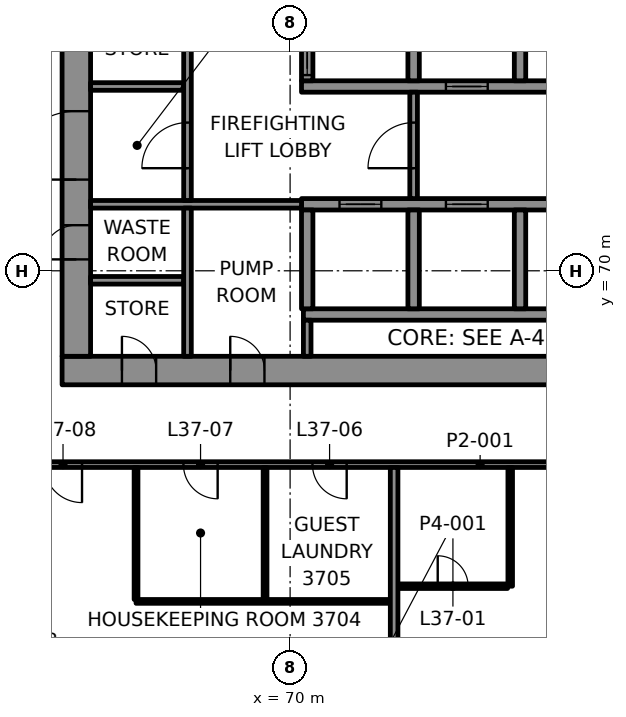
"""IFC4 building model, lengths in metres.
Left out: names, types, materials, properties, quantities, classifications, styles, units other than length and angle.
Written with IfcOpenShell. Run it as: python <this file> out.ifc"""

import sys

from ifc_helpers import new_model, si_unit, direction, frame, frame_2d, origin, place, context, subcontext, project, spatial, rectangle, extrude, element, fill, save


model = new_model("IFC4")
c1 = context("Model", 3, precision=1e-05, world=origin(), true_north=direction((0.0, 1.0)))
c2 = subcontext(c1, "Body", "Model", "MODEL_VIEW")
j1 = project(units=[si_unit("LENGTHUNIT", "METRE"), si_unit("PLANEANGLEUNIT", "RADIAN")], contexts=[c1])
p1 = place(None, origin())
s1 = spatial("IfcSite", under=j1, at=p1, CompositionType="ELEMENT")
p2 = place(p1, origin())
s2 = spatial("IfcBuilding", under=s1, at=p2, CompositionType="ELEMENT")
p3 = place(p2, frame((0.0, 0.0, 163.6)))
s3 = spatial("IfcBuildingStorey", under=s2, at=p3, CompositionType="ELEMENT", Elevation=163.6)
p4 = place(p3, frame((64.0, 67.375, 0.0), z_axis=(0.0, 0.0, 1.0), x_axis=(1.0, 0.0, 0.0)))
e1 = element("IfcWall", 1, at=p4, inside=s3, PredefinedType="SHEAR", context=c2, shape_type="SweptSolid", body=[
    extrude(rectangle(XDim=22.0, YDim=0.75, at=frame_2d((11.0, 0.0))), origin(), (0.0, 0.0, 1.0), 3.7),
])
p5 = place(p4, frame((1.575, 0.0, 0.0)))
e2 = element("IfcOpeningElement", 2, at=p5, cuts=e1, PredefinedType="OPENING", context=c2, shape_type="SweptSolid", body=[
    extrude(rectangle(XDim=0.9, YDim=2.1, at=frame_2d((0.45, 1.05))), frame((0.0, 0.385, 0.0), z_axis=(0.0, -1.0, 0.0), x_axis=(1.0, 0.0, 0.0)), (0.0, 0.0, 1.0), 0.77),
])
p6 = place(p4, frame((4.425, 0.0, 0.0)))
e3 = element("IfcOpeningElement", 3, at=p6, cuts=e1, PredefinedType="OPENING", context=c2, shape_type="SweptSolid", body=[
    extrude(rectangle(XDim=0.9, YDim=2.1, at=frame_2d((0.45, 1.05))), frame((0.0, 0.385, 0.0), z_axis=(0.0, -1.0, 0.0), x_axis=(1.0, 0.0, 0.0)), (0.0, 0.0, 1.0), 0.77),
])
p7 = place(p3, frame((64.375, 67.75, 0.0), z_axis=(0.0, 0.0, 1.0), x_axis=(0.0, 1.0, 0.0)))
e4 = element("IfcWall", 4, at=p7, inside=s3, PredefinedType="SHEAR", context=c2, shape_type="SweptSolid", body=[
    extrude(rectangle(XDim=14.5, YDim=0.75, at=frame_2d((7.25, 0.0))), origin(), (0.0, 0.0, 1.0), 3.7),
])
p8 = place(p7, frame((4.65, 0.0, 0.0)))
e5 = element("IfcOpeningElement", 5, at=p8, cuts=e4, PredefinedType="OPENING", context=c2, shape_type="SweptSolid", body=[
    extrude(rectangle(XDim=1.8, YDim=2.1, at=frame_2d((0.9, 1.05))), frame((0.0, 0.385, 0.0), z_axis=(0.0, -1.0, 0.0), x_axis=(1.0, 0.0, 0.0)), (0.0, 0.0, 1.0), 0.77),
])
p9 = place(p7, frame((2.55, 0.0, 0.0)))
e6 = element("IfcOpeningElement", 6, at=p9, cuts=e4, PredefinedType="OPENING", context=c2, shape_type="SweptSolid", body=[
    extrude(rectangle(XDim=0.9, YDim=2.1, at=frame_2d((0.45, 1.05))), frame((0.0, 0.385, 0.0), z_axis=(0.0, -1.0, 0.0), x_axis=(1.0, 0.0, 0.0)), (0.0, 0.0, 1.0), 0.77),
])
p10 = place(p7, frame((10.35, 0.0, 0.0)))
e7 = element("IfcOpeningElement", 7, at=p10, cuts=e4, PredefinedType="OPENING", context=c2, shape_type="SweptSolid", body=[
    extrude(rectangle(XDim=0.9, YDim=2.1, at=frame_2d((0.45, 1.05))), frame((0.0, 0.385, 0.0), z_axis=(0.0, -1.0, 0.0), x_axis=(1.0, 0.0, 0.0)), (0.0, 0.0, 1.0), 0.77),
])
p11 = place(p3, frame((70.35, 68.85, 0.0), z_axis=(0.0, 0.0, 1.0), x_axis=(1.0, 0.0, 0.0)))
e8 = element("IfcWall", 8, at=p11, inside=s3, PredefinedType="SHEAR", context=c2, shape_type="SweptSolid", body=[
    extrude(rectangle(XDim=14.2, YDim=0.3, at=frame_2d((7.1, 0.0))), origin(), (0.0, 0.0, 1.0), 3.7),
])
p12 = place(p3, frame((70.3, 71.75, 0.0), z_axis=(0.0, 0.0, 1.0), x_axis=(1.0, 0.0, 0.0)))
e9 = element("IfcWall", 9, at=p12, inside=s3, PredefinedType="SHEAR", context=c2, shape_type="SweptSolid", body=[
    extrude(rectangle(XDim=14.3, YDim=0.3, at=frame_2d((7.15, 0.0))), origin(), (0.0, 0.0, 1.0), 3.7),
])
p13 = place(p12, frame((1.0, 0.0, 0.0)))
e10 = element("IfcOpeningElement", 10, at=p13, cuts=e9, PredefinedType="OPENING", context=c2, shape_type="SweptSolid", body=[
    extrude(rectangle(XDim=1.1, YDim=2.1, at=frame_2d((0.55, 1.05))), frame((0.0, 0.16, 0.0), z_axis=(0.0, -1.0, 0.0), x_axis=(1.0, 0.0, 0.0)), (0.0, 0.0, 1.0), 0.32),
])
p14 = place(p12, frame((3.8, 0.0, 0.0)))
e11 = element("IfcOpeningElement", 11, at=p14, cuts=e9, PredefinedType="OPENING", context=c2, shape_type="SweptSolid", body=[
    extrude(rectangle(XDim=1.1, YDim=2.1, at=frame_2d((0.55, 1.05))), frame((0.0, 0.16, 0.0), z_axis=(0.0, -1.0, 0.0), x_axis=(1.0, 0.0, 0.0)), (0.0, 0.0, 1.0), 0.32),
])
p15 = place(p12, frame((6.6, 0.0, 0.0)))
e12 = element("IfcOpeningElement", 12, at=p15, cuts=e9, PredefinedType="OPENING", context=c2, shape_type="SweptSolid", body=[
    extrude(rectangle(XDim=1.1, YDim=2.1, at=frame_2d((0.55, 1.05))), frame((0.0, 0.16, 0.0), z_axis=(0.0, -1.0, 0.0), x_axis=(1.0, 0.0, 0.0)), (0.0, 0.0, 1.0), 0.32),
])
p16 = place(p12, frame((9.4, 0.0, 0.0)))
e13 = element("IfcOpeningElement", 13, at=p16, cuts=e9, PredefinedType="OPENING", context=c2, shape_type="SweptSolid", body=[
    extrude(rectangle(XDim=1.1, YDim=2.1, at=frame_2d((0.55, 1.05))), frame((0.0, 0.16, 0.0), z_axis=(0.0, -1.0, 0.0), x_axis=(1.0, 0.0, 0.0)), (0.0, 0.0, 1.0), 0.32),
])
p17 = place(p12, frame((12.2, 0.0, 0.0)))
e14 = element("IfcOpeningElement", 14, at=p17, cuts=e9, PredefinedType="OPENING", context=c2, shape_type="SweptSolid", body=[
    extrude(rectangle(XDim=1.1, YDim=2.1, at=frame_2d((0.55, 1.05))), frame((0.0, 0.16, 0.0), z_axis=(0.0, -1.0, 0.0), x_axis=(1.0, 0.0, 0.0)), (0.0, 0.0, 1.0), 0.32),
])
p18 = place(p3, frame((70.3, 74.85, 0.0), z_axis=(0.0, 0.0, 1.0), x_axis=(1.0, 0.0, 0.0)))
e15 = element("IfcWall", 15, at=p18, inside=s3, PredefinedType="SHEAR", context=c2, shape_type="SweptSolid", body=[
    extrude(rectangle(XDim=14.3, YDim=0.3, at=frame_2d((7.15, 0.0))), origin(), (0.0, 0.0, 1.0), 3.7),
])
p19 = place(p18, frame((3.8, 0.0, 0.0)))
e16 = element("IfcOpeningElement", 16, at=p19, cuts=e15, PredefinedType="OPENING", context=c2, shape_type="SweptSolid", body=[
    extrude(rectangle(XDim=1.1, YDim=2.1, at=frame_2d((0.55, 1.05))), frame((0.0, 0.16, 0.0), z_axis=(0.0, -1.0, 0.0), x_axis=(1.0, 0.0, 0.0)), (0.0, 0.0, 1.0), 0.32),
])
p20 = place(p18, frame((12.2, 0.0, 0.0)))
e17 = element("IfcOpeningElement", 17, at=p20, cuts=e15, PredefinedType="OPENING", context=c2, shape_type="SweptSolid", body=[
    extrude(rectangle(XDim=1.1, YDim=2.1, at=frame_2d((0.55, 1.05))), frame((0.0, 0.16, 0.0), z_axis=(0.0, -1.0, 0.0), x_axis=(1.0, 0.0, 0.0)), (0.0, 0.0, 1.0), 0.32),
])
p21 = place(p3, frame((70.45, 69.0, 0.0), z_axis=(0.0, 0.0, 1.0), x_axis=(0.0, 1.0, 0.0)))
e18 = element("IfcWall", 18, at=p21, inside=s3, PredefinedType="SHEAR", context=c2, shape_type="SweptSolid", body=[
    extrude(rectangle(XDim=2.6, YDim=0.3, at=frame_2d((1.3, 0.0))), origin(), (0.0, 0.0, 1.0), 3.7),
])
p22 = place(p3, frame((70.45, 75.0, 0.0), z_axis=(0.0, 0.0, 1.0), x_axis=(0.0, 1.0, 0.0)))
e19 = element("IfcWall", 19, at=p22, inside=s3, PredefinedType="SHEAR", context=c2, shape_type="SweptSolid", body=[
    extrude(rectangle(XDim=2.6, YDim=0.3, at=frame_2d((1.3, 0.0))), origin(), (0.0, 0.0, 1.0), 3.7),
])
p23 = place(p22, frame((0.15, 0.0, 0.0)))
e20 = element("IfcOpeningElement", 20, at=p23, cuts=e19, PredefinedType="OPENING", context=c2, shape_type="SweptSolid", body=[
    extrude(rectangle(XDim=1.1, YDim=2.1, at=frame_2d((0.55, 1.05))), frame((0.0, 0.16, 0.0), z_axis=(0.0, -1.0, 0.0), x_axis=(1.0, 0.0, 0.0)), (0.0, 0.0, 1.0), 0.32),
])
for number, where, z_axis, x_axis in (
    (21, (73.25, 69.0, 0.0), (0.0, 0.0, 1.0), (0.0, 1.0, 0.0)),
    (22, (73.25, 75.0, 0.0), (0.0, 0.0, 1.0), (0.0, 1.0, 0.0)),
    (23, (76.05, 69.0, 0.0), (0.0, 0.0, 1.0), (0.0, 1.0, 0.0)),
    (24, (76.05, 75.0, 0.0), (0.0, 0.0, 1.0), (0.0, 1.0, 0.0)),
):
    element("IfcWall", number, at=place(p3, frame(where, z_axis=z_axis, x_axis=x_axis)), inside=s3, PredefinedType="SHEAR", context=c2, shape_type="SweptSolid", body=[
        extrude(rectangle(XDim=2.6, YDim=0.3, at=frame_2d((1.3, 0.0))), origin(), (0.0, 0.0, 1.0), 3.7),
    ])
p24 = place(p3, frame((65.946, 61.3, 0.0), z_axis=(0.0, 0.0, 1.0), x_axis=(1.0, 0.0, 0.0)))
e25 = element("IfcWall", 25, at=p24, inside=s3, PredefinedType="PARTITIONING", context=c2, shape_type="SweptSolid", body=[
    extrude(rectangle(XDim=6.69, YDim=0.1, at=frame_2d((3.345, 0.0))), origin(), (0.0, 0.0, 1.0), 3.1),
])
p25 = place(p3, frame((72.846, 61.7, 0.0), z_axis=(0.0, 0.0, 1.0), x_axis=(1.0, 0.0, 0.0)))
e26 = element("IfcWall", 26, at=p25, inside=s3, PredefinedType="PARTITIONING", context=c2, shape_type="SweptSolid", body=[
    extrude(rectangle(XDim=2.876, YDim=0.12, at=frame_2d((1.438, 0.0))), origin(), (0.0, 0.0, 1.0), 3.1),
])
p26 = place(p25, frame((1.038, 0.0, 0.0)))
e27 = element("IfcOpeningElement", 27, at=p26, cuts=e26, PredefinedType="OPENING", context=c2, shape_type="SweptSolid", body=[
    extrude(rectangle(XDim=0.8, YDim=2.1, at=frame_2d((0.4, 1.05))), frame((0.0, 0.07, 0.0), z_axis=(0.0, -1.0, 0.0), x_axis=(1.0, 0.0, 0.0)), (0.0, 0.0, 1.0), 0.14),
])
p27 = place(p3, frame((88.1, 64.9, 0.0), z_axis=(0.0, 0.0, 1.0), x_axis=(-1.0, 0.0, 0.0)))
e28 = element("IfcWall", 28, at=p27, inside=s3, PredefinedType="PARTITIONING", context=c2, shape_type="SweptSolid", body=[
    extrude(rectangle(XDim=26.199, YDim=0.15, at=frame_2d((13.1, 0.0))), origin(), (0.0, 0.0, 1.0), 3.1),
])
p28 = place(p27, frame((0.322, 0.0, 0.0)))
e29 = element("IfcOpeningElement", 29, at=p28, cuts=e28, PredefinedType="OPENING", context=c2, shape_type="SweptSolid", body=[
    extrude(rectangle(XDim=1.0, YDim=2.1, at=frame_2d((0.5, 1.05))), frame((0.0, 0.085, 0.0), z_axis=(0.0, -1.0, 0.0), x_axis=(1.0, 0.0, 0.0)), (0.0, 0.0, 1.0), 0.17),
])
p29 = place(p27, frame((5.859, 0.0, 0.0)))
e30 = element("IfcOpeningElement", 30, at=p29, cuts=e28, PredefinedType="OPENING", context=c2, shape_type="SweptSolid", body=[
    extrude(rectangle(XDim=0.9, YDim=2.1, at=frame_2d((0.45, 1.05))), frame((0.0, 0.085, 0.0), z_axis=(0.0, -1.0, 0.0), x_axis=(1.0, 0.0, 0.0)), (0.0, 0.0, 1.0), 0.17),
])
p30 = place(p27, frame((8.981, 0.0, 0.0)))
e31 = element("IfcOpeningElement", 31, at=p30, cuts=e28, PredefinedType="OPENING", context=c2, shape_type="SweptSolid", body=[
    extrude(rectangle(XDim=1.0, YDim=2.1, at=frame_2d((0.5, 1.05))), frame((0.0, 0.085, 0.0), z_axis=(0.0, -1.0, 0.0), x_axis=(1.0, 0.0, 0.0)), (0.0, 0.0, 1.0), 0.17),
])
p31 = place(p27, frame((16.611, 0.0, 0.0)))
e32 = element("IfcOpeningElement", 32, at=p31, cuts=e28, PredefinedType="OPENING", context=c2, shape_type="SweptSolid", body=[
    extrude(rectangle(XDim=0.9, YDim=2.1, at=frame_2d((0.45, 1.05))), frame((0.0, 0.085, 0.0), z_axis=(0.0, -1.0, 0.0), x_axis=(1.0, 0.0, 0.0)), (0.0, 0.0, 1.0), 0.17),
])
p32 = place(p27, frame((20.006, 0.0, 0.0)))
e33 = element("IfcOpeningElement", 33, at=p32, cuts=e28, PredefinedType="OPENING", context=c2, shape_type="SweptSolid", body=[
    extrude(rectangle(XDim=0.9, YDim=2.1, at=frame_2d((0.45, 1.05))), frame((0.0, 0.085, 0.0), z_axis=(0.0, -1.0, 0.0), x_axis=(1.0, 0.0, 0.0)), (0.0, 0.0, 1.0), 0.17),
])
p33 = place(p27, frame((23.575, 0.0, 0.0)))
e34 = element("IfcOpeningElement", 34, at=p33, cuts=e28, PredefinedType="OPENING", context=c2, shape_type="SweptSolid", body=[
    extrude(rectangle(XDim=1.0, YDim=2.1, at=frame_2d((0.5, 1.05))), frame((0.0, 0.085, 0.0), z_axis=(0.0, -1.0, 0.0), x_axis=(1.0, 0.0, 0.0)), (0.0, 0.0, 1.0), 0.17),
])
p34 = place(p3, frame((75.792, 61.7, 0.0), z_axis=(0.0, 0.0, 1.0), x_axis=(0.0, 1.0, 0.0)))
e35 = element("IfcWall", 35, at=p34, inside=s3, PredefinedType="PARTITIONING", context=c2, shape_type="SweptSolid", body=[
    extrude(rectangle(XDim=3.125, YDim=0.12, at=frame_2d((1.562, 0.0))), origin(), (0.0, 0.0, 1.0), 3.1),
])
p35 = place(p3, frame((72.737, 55.101, 0.0), z_axis=(0.0, 0.0, 1.0), x_axis=(0.0, 1.0, 0.0)))
e36 = element("IfcWall", 36, at=p35, inside=s3, PredefinedType="PARTITIONING", context=c2, shape_type="SweptSolid", body=[
    extrude(rectangle(XDim=9.724, YDim=0.2, at=frame_2d((4.862, 0.0))), origin(), (0.0, 0.0, 1.0), 2.865),
])
for number, where, z_axis, x_axis in (
    (37, (69.341, 61.35, 0.0), (0.0, 0.0, 1.0), (0.0, 1.0, 0.0)),
    (38, (65.946, 61.35, 0.0), (0.0, 0.0, 1.0), (0.0, 1.0, 0.0)),
):
    element("IfcWall", number, at=place(p3, frame(where, z_axis=z_axis, x_axis=x_axis)), inside=s3, PredefinedType="PARTITIONING", context=c2, shape_type="SweptSolid", body=[
        extrude(rectangle(XDim=3.475, YDim=0.1, at=frame_2d((1.737, 0.0))), origin(), (0.0, 0.0, 1.0), 3.1),
    ])
p36 = place(p3, frame((64.75, 69.75, 0.0), z_axis=(0.0, 0.0, 1.0), x_axis=(1.0, 0.0, 0.0)))
e39 = element("IfcWall", 39, at=p36, inside=s3, PredefinedType="PARTITIONING", context=c2, shape_type="SweptSolid", body=[
    extrude(rectangle(XDim=2.45, YDim=0.2, at=frame_2d((1.225, 0.0))), origin(), (0.0, 0.0, 1.0), 3.7),
])
p37 = place(p3, frame((64.75, 71.75, 0.0), z_axis=(0.0, 0.0, 1.0), x_axis=(1.0, 0.0, 0.0)))
e40 = element("IfcWall", 40, at=p37, inside=s3, PredefinedType="PARTITIONING", context=c2, shape_type="SweptSolid", body=[
    extrude(rectangle(XDim=5.55, YDim=0.2, at=frame_2d((2.775, 0.0))), origin(), (0.0, 0.0, 1.0), 3.7),
])
p38 = place(p3, frame((64.75, 74.85, 0.0), z_axis=(0.0, 0.0, 1.0), x_axis=(1.0, 0.0, 0.0)))
e41 = element("IfcWall", 41, at=p38, inside=s3, PredefinedType="PARTITIONING", context=c2, shape_type="SweptSolid", body=[
    extrude(rectangle(XDim=2.45, YDim=0.2, at=frame_2d((1.225, 0.0))), origin(), (0.0, 0.0, 1.0), 3.7),
])
p39 = place(p3, frame((67.3, 67.75, 0.0), z_axis=(0.0, 0.0, 1.0), x_axis=(0.0, 1.0, 0.0)))
e42 = element("IfcWall", 42, at=p39, inside=s3, PredefinedType="PARTITIONING", context=c2, shape_type="SweptSolid", body=[
    extrude(rectangle(XDim=3.9, YDim=0.2, at=frame_2d((1.95, 0.0))), origin(), (0.0, 0.0, 1.0), 3.7),
])
p40 = place(p3, frame((67.3, 71.85, 0.0), z_axis=(0.0, 0.0, 1.0), x_axis=(0.0, 1.0, 0.0)))
e43 = element("IfcWall", 43, at=p40, inside=s3, PredefinedType="PARTITIONING", context=c2, shape_type="SweptSolid", body=[
    extrude(rectangle(XDim=5.75, YDim=0.2, at=frame_2d((2.875, 0.0))), origin(), (0.0, 0.0, 1.0), 3.7),
])
p41 = place(p40, frame((0.85, 0.0, 0.0)))
e44 = element("IfcOpeningElement", 44, at=p41, cuts=e43, PredefinedType="OPENING", context=c2, shape_type="SweptSolid", body=[
    extrude(rectangle(XDim=1.2, YDim=2.1, at=frame_2d((0.6, 1.05))), frame((0.0, 0.11, 0.0), z_axis=(0.0, -1.0, 0.0), x_axis=(1.0, 0.0, 0.0)), (0.0, 0.0, 1.0), 0.22),
])
p42 = place(p3, frame((70.45, 67.75, 0.0), z_axis=(0.0, 0.0, 1.0), x_axis=(0.0, 1.0, 0.0)))
e45 = element("IfcWall", 45, at=p42, inside=s3, PredefinedType="PARTITIONING", context=c2, shape_type="SweptSolid", body=[
    extrude(rectangle(XDim=0.95, YDim=0.2, at=frame_2d((0.475, 0.0))), origin(), (0.0, 0.0, 1.0), 3.7),
])
p43 = place(p3, frame((73.25, 71.9, 0.0), z_axis=(0.0, 0.0, 1.0), x_axis=(0.0, 1.0, 0.0)))
e46 = element("IfcWall", 46, at=p43, inside=s3, PredefinedType="PARTITIONING", context=c2, shape_type="SweptSolid", body=[
    extrude(rectangle(XDim=2.8, YDim=0.2, at=frame_2d((1.4, 0.0))), origin(), (0.0, 0.0, 1.0), 3.7),
])
p44 = place(p43, frame((0.8, 0.0, 0.0)))
e47 = element("IfcOpeningElement", 47, at=p44, cuts=e46, PredefinedType="OPENING", context=c2, shape_type="SweptSolid", body=[
    extrude(rectangle(XDim=1.2, YDim=2.1, at=frame_2d((0.6, 1.05))), frame((0.0, 0.11, 0.0), z_axis=(0.0, -1.0, 0.0), x_axis=(1.0, 0.0, 0.0)), (0.0, 0.0, 1.0), 0.22),
])
p45 = place(p26, origin())
e48 = element("IfcDoor", 48, at=p45, inside=s3, OperationType="SINGLE_SWING_RIGHT", PredefinedType="DOOR", context=c2, shape_type="SweptSolid", body=[
    extrude(rectangle(XDim=0.8, YDim=2.1, at=frame_2d((0.4, 1.05))), frame((0.0, 0.025, 0.0), z_axis=(0.0, -1.0, 0.0), x_axis=(1.0, 0.0, 0.0)), (0.0, 0.0, 1.0), 0.05),
])
fill(e27, e48)
p46 = place(p31, origin())
e49 = element("IfcDoor", 49, at=p46, inside=s3, OperationType="SINGLE_SWING_LEFT", PredefinedType="DOOR", context=c2, shape_type="SweptSolid", body=[
    extrude(rectangle(XDim=0.9, YDim=2.1, at=frame_2d((0.45, 1.05))), frame((0.0, 0.025, 0.0), z_axis=(0.0, -1.0, 0.0), x_axis=(1.0, 0.0, 0.0)), (0.0, 0.0, 1.0), 0.05),
])
fill(e32, e49)
p47 = place(p32, origin())
e50 = element("IfcDoor", 50, at=p47, inside=s3, OperationType="SINGLE_SWING_RIGHT", PredefinedType="DOOR", context=c2, shape_type="SweptSolid", body=[
    extrude(rectangle(XDim=0.9, YDim=2.1, at=frame_2d((0.45, 1.05))), frame((0.0, 0.025, 0.0), z_axis=(0.0, -1.0, 0.0), x_axis=(1.0, 0.0, 0.0)), (0.0, 0.0, 1.0), 0.05),
])
fill(e33, e50)
p48 = place(p33, origin())
e51 = element("IfcDoor", 51, at=p48, inside=s3, OperationType="SINGLE_SWING_LEFT", PredefinedType="DOOR", context=c2, shape_type="SweptSolid", body=[
    extrude(rectangle(XDim=1.0, YDim=2.1, at=frame_2d((0.5, 1.05))), frame((0.0, 0.025, 0.0), z_axis=(0.0, -1.0, 0.0), x_axis=(1.0, 0.0, 0.0)), (0.0, 0.0, 1.0), 0.05),
])
fill(e34, e51)
p49 = place(p13, origin())
e52 = element("IfcDoor", 52, at=p49, inside=s3, OperationType="DOUBLE_DOOR_SLIDING", PredefinedType="DOOR", context=c2, shape_type="SweptSolid", body=[
    extrude(rectangle(XDim=1.1, YDim=2.1, at=frame_2d((0.55, 1.05))), frame((0.0, 0.025, 0.0), z_axis=(0.0, -1.0, 0.0), x_axis=(1.0, 0.0, 0.0)), (0.0, 0.0, 1.0), 0.05),
])
fill(e10, e52)
p50 = place(p14, origin())
e53 = element("IfcDoor", 53, at=p50, inside=s3, OperationType="DOUBLE_DOOR_SLIDING", PredefinedType="DOOR", context=c2, shape_type="SweptSolid", body=[
    extrude(rectangle(XDim=1.1, YDim=2.1, at=frame_2d((0.55, 1.05))), frame((0.0, 0.025, 0.0), z_axis=(0.0, -1.0, 0.0), x_axis=(1.0, 0.0, 0.0)), (0.0, 0.0, 1.0), 0.05),
])
fill(e11, e53)
p51 = place(p23, origin())
e54 = element("IfcDoor", 54, at=p51, inside=s3, OperationType="DOUBLE_DOOR_SLIDING", PredefinedType="DOOR", context=c2, shape_type="SweptSolid", body=[
    extrude(rectangle(XDim=1.1, YDim=2.1, at=frame_2d((0.55, 1.05))), frame((0.0, 0.025, 0.0), z_axis=(0.0, -1.0, 0.0), x_axis=(1.0, 0.0, 0.0)), (0.0, 0.0, 1.0), 0.05),
])
fill(e20, e54)
p52 = place(p19, origin())
e55 = element("IfcDoor", 55, at=p52, inside=s3, OperationType="DOUBLE_DOOR_SLIDING", PredefinedType="DOOR", context=c2, shape_type="SweptSolid", body=[
    extrude(rectangle(XDim=1.1, YDim=2.1, at=frame_2d((0.55, 1.05))), frame((0.0, 0.025, 0.0), z_axis=(0.0, -1.0, 0.0), x_axis=(1.0, 0.0, 0.0)), (0.0, 0.0, 1.0), 0.05),
])
fill(e16, e55)
p53 = place(p44, origin())
e56 = element("IfcDoor", 56, at=p53, inside=s3, OperationType="SINGLE_SWING_LEFT", PredefinedType="DOOR", context=c2, shape_type="SweptSolid", body=[
    extrude(rectangle(XDim=1.2, YDim=2.1, at=frame_2d((0.6, 1.05))), frame((0.0, 0.025, 0.0), z_axis=(0.0, -1.0, 0.0), x_axis=(1.0, 0.0, 0.0)), (0.0, 0.0, 1.0), 0.05),
])
fill(e47, e56)
p54 = place(p41, origin())
e57 = element("IfcDoor", 57, at=p54, inside=s3, OperationType="SINGLE_SWING_RIGHT", PredefinedType="DOOR", context=c2, shape_type="SweptSolid", body=[
    extrude(rectangle(XDim=1.2, YDim=2.1, at=frame_2d((0.6, 1.05))), frame((0.0, 0.025, 0.0), z_axis=(0.0, -1.0, 0.0), x_axis=(1.0, 0.0, 0.0)), (0.0, 0.0, 1.0), 0.05),
])
fill(e44, e57)
p55 = place(p8, origin())
e58 = element("IfcDoor", 58, at=p55, inside=s3, OperationType="SINGLE_SWING_LEFT", PredefinedType="DOOR", context=c2, shape_type="SweptSolid", body=[
    extrude(rectangle(XDim=1.8, YDim=2.1, at=frame_2d((0.9, 1.05))), frame((0.0, 0.095, 0.0), z_axis=(0.0, -1.0, 0.0), x_axis=(1.0, 0.0, 0.0)), (0.0, 0.0, 1.0), 0.19),
])
fill(e5, e58)
p56 = place(p5, origin())
e59 = element("IfcDoor", 59, at=p56, inside=s3, OperationType="SINGLE_SWING_LEFT", PredefinedType="DOOR", context=c2, shape_type="SweptSolid", body=[
    extrude(rectangle(XDim=0.9, YDim=2.1, at=frame_2d((0.45, 1.05))), frame((0.0, 0.095, 0.0), z_axis=(0.0, -1.0, 0.0), x_axis=(1.0, 0.0, 0.0)), (0.0, 0.0, 1.0), 0.19),
])
fill(e2, e59)
p57 = place(p9, origin())
e60 = element("IfcDoor", 60, at=p57, inside=s3, OperationType="SINGLE_SWING_RIGHT", PredefinedType="DOOR", context=c2, shape_type="SweptSolid", body=[
    extrude(rectangle(XDim=0.9, YDim=2.1, at=frame_2d((0.45, 1.05))), frame((0.0, 0.095, 0.0), z_axis=(0.0, -1.0, 0.0), x_axis=(1.0, 0.0, 0.0)), (0.0, 0.0, 1.0), 0.19),
])
fill(e6, e60)
p58 = place(p6, origin())
e61 = element("IfcDoor", 61, at=p58, inside=s3, OperationType="SINGLE_SWING_LEFT", PredefinedType="DOOR", context=c2, shape_type="SweptSolid", body=[
    extrude(rectangle(XDim=0.9, YDim=2.1, at=frame_2d((0.45, 1.05))), frame((0.0, 0.095, 0.0), z_axis=(0.0, -1.0, 0.0), x_axis=(1.0, 0.0, 0.0)), (0.0, 0.0, 1.0), 0.19),
])
fill(e3, e61)
save(model, sys.argv[1])
